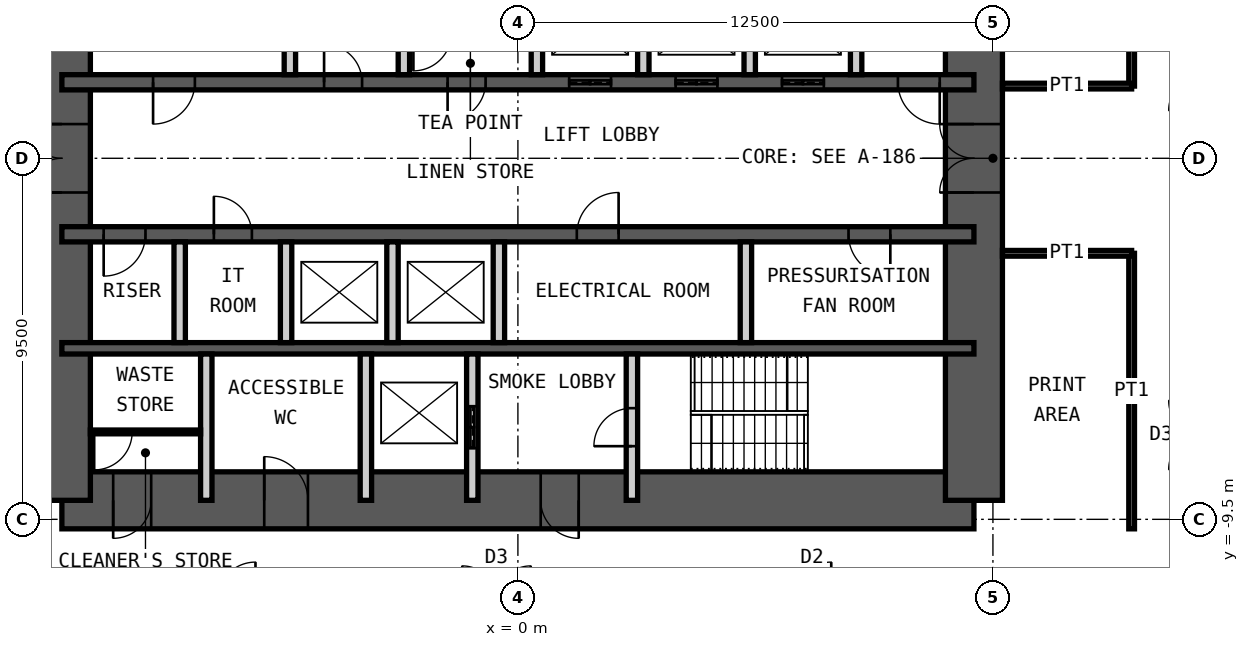
"""IFC4 building model, lengths in metres.
Left out: names, types, materials, properties, quantities, classifications, styles, units other than length and angle.
Written with IfcOpenShell. Run it as: python <this file> out.ifc"""

import sys

from ifc_helpers import new_model, si_unit, direction, frame, frame_2d, origin, place, context, subcontext, project, spatial, rectangle, extrude, element, fill, save


model = new_model("IFC4")
c1 = context("Model", 3, precision=1e-05, world=origin(), true_north=direction((0.0, 1.0)))
c2 = subcontext(c1, "Body", "Model", "MODEL_VIEW")
j1 = project(units=[si_unit("LENGTHUNIT", "METRE"), si_unit("PLANEANGLEUNIT", "RADIAN")], contexts=[c1])
p1 = place(None, origin())
s1 = spatial("IfcSite", under=j1, at=p1, CompositionType="ELEMENT")
p2 = place(p1, origin())
s2 = spatial("IfcBuilding", under=s1, at=p2, CompositionType="ELEMENT")
p3 = place(p2, frame((0.0, 0.0, 149.2)))
s3 = spatial("IfcBuildingStorey", under=s2, at=p3, CompositionType="ELEMENT", Elevation=149.2)
p4 = place(p3, frame((-12.0, -9.0, 0.0), z_axis=(0.0, 0.0, 1.0), x_axis=(1.0, 0.0, 0.0)))
e1 = element("IfcWall", 1, at=p4, inside=s3, PredefinedType="SHEAR", context=c2, shape_type="SweptSolid", body=[
    extrude(rectangle(XDim=24.0, YDim=1.5, at=frame_2d((12.0, 0.0))), origin(), (0.0, 0.0, 1.0), 4.2),
])
p5 = place(p4, frame((1.35, 0.0, 0.0)))
e2 = element("IfcOpeningElement", 2, at=p5, cuts=e1, PredefinedType="OPENING", context=c2, shape_type="SweptSolid", body=[
    extrude(rectangle(XDim=1.0, YDim=2.1, at=frame_2d((0.5, 1.05))), frame((0.0, 0.76, 0.0), z_axis=(0.0, -1.0, 0.0), x_axis=(1.0, 0.0, 0.0)), (0.0, 0.0, 1.0), 1.52),
])
p6 = place(p4, frame((5.325, 0.0, 0.0)))
e3 = element("IfcOpeningElement", 3, at=p6, cuts=e1, PredefinedType="OPENING", context=c2, shape_type="SweptSolid", body=[
    extrude(rectangle(XDim=1.15, YDim=2.1, at=frame_2d((0.575, 1.05))), frame((0.0, 0.76, 0.0), z_axis=(0.0, -1.0, 0.0), x_axis=(1.0, 0.0, 0.0)), (0.0, 0.0, 1.0), 1.52),
])
p7 = place(p4, frame((12.6, 0.0, 0.0)))
e4 = element("IfcOpeningElement", 4, at=p7, cuts=e1, PredefinedType="OPENING", context=c2, shape_type="SweptSolid", body=[
    extrude(rectangle(XDim=1.0, YDim=2.1, at=frame_2d((0.5, 1.05))), frame((0.0, 0.76, 0.0), z_axis=(0.0, -1.0, 0.0), x_axis=(1.0, 0.0, 0.0)), (0.0, 0.0, 1.0), 1.52),
])
p8 = place(p3, frame((12.0, -9.0, 0.0), z_axis=(0.0, 0.0, 1.0), x_axis=(0.0, 1.0, 0.0)))
e5 = element("IfcWall", 5, at=p8, inside=s3, PredefinedType="SHEAR", context=c2, shape_type="SweptSolid", body=[
    extrude(rectangle(XDim=18.0, YDim=1.5, at=frame_2d((9.0, 0.0))), origin(), (0.0, 0.0, 1.0), 4.2),
])
p9 = place(p8, frame((8.1, 0.0, 0.0)))
e6 = element("IfcOpeningElement", 6, at=p9, cuts=e5, PredefinedType="OPENING", context=c2, shape_type="SweptSolid", body=[
    extrude(rectangle(XDim=1.8, YDim=2.1, at=frame_2d((0.9, 1.05))), frame((0.0, 0.76, 0.0), z_axis=(0.0, -1.0, 0.0), x_axis=(1.0, 0.0, 0.0)), (0.0, 0.0, 1.0), 1.52),
])
p10 = place(p3, frame((-12.0, -9.0, 0.0), z_axis=(0.0, 0.0, 1.0), x_axis=(0.0, 1.0, 0.0)))
e7 = element("IfcWall", 7, at=p10, inside=s3, PredefinedType="SHEAR", context=c2, shape_type="SweptSolid", body=[
    extrude(rectangle(XDim=18.0, YDim=1.5, at=frame_2d((9.0, 0.0))), origin(), (0.0, 0.0, 1.0), 4.2),
])
p11 = place(p10, frame((8.1, 0.0, 0.0)))
e8 = element("IfcOpeningElement", 8, at=p11, cuts=e7, PredefinedType="OPENING", context=c2, shape_type="SweptSolid", body=[
    extrude(rectangle(XDim=1.8, YDim=2.1, at=frame_2d((0.9, 1.05))), frame((0.0, 0.76, 0.0), z_axis=(0.0, -1.0, 0.0), x_axis=(1.0, 0.0, 0.0)), (0.0, 0.0, 1.0), 1.52),
])
p12 = place(p3, frame((-12.0, 2.0, 0.0), z_axis=(0.0, 0.0, 1.0), x_axis=(1.0, 0.0, 0.0)))
e9 = element("IfcWall", 9, at=p12, inside=s3, PredefinedType="SHEAR", context=c2, shape_type="SweptSolid", body=[
    extrude(rectangle(XDim=24.0, YDim=0.4, at=frame_2d((12.0, 0.0))), origin(), (0.0, 0.0, 1.0), 4.2),
])
p13 = place(p12, frame((2.4, 0.0, 0.0)))
e10 = element("IfcOpeningElement", 10, at=p13, cuts=e9, PredefinedType="OPENING", context=c2, shape_type="SweptSolid", body=[
    extrude(rectangle(XDim=1.1, YDim=2.1, at=frame_2d((0.55, 1.05))), frame((0.0, 0.21, 0.0), z_axis=(0.0, -1.0, 0.0), x_axis=(1.0, 0.0, 0.0)), (0.0, 0.0, 1.0), 0.42),
])
p14 = place(p12, frame((22.0, 0.0, 0.0)))
e11 = element("IfcOpeningElement", 11, at=p14, cuts=e9, PredefinedType="OPENING", context=c2, shape_type="SweptSolid", body=[
    extrude(rectangle(XDim=1.1, YDim=2.1, at=frame_2d((0.55, 1.05))), frame((0.0, 0.21, 0.0), z_axis=(0.0, -1.0, 0.0), x_axis=(1.0, 0.0, 0.0)), (0.0, 0.0, 1.0), 0.42),
])
p15 = place(p12, frame((10.15, 0.0, 0.0)))
e12 = element("IfcOpeningElement", 12, at=p15, cuts=e9, PredefinedType="OPENING", context=c2, shape_type="SweptSolid", body=[
    extrude(rectangle(XDim=1.0, YDim=2.1, at=frame_2d((0.5, 1.05))), frame((0.0, 0.21, 0.0), z_axis=(0.0, -1.0, 0.0), x_axis=(1.0, 0.0, 0.0)), (0.0, 0.0, 1.0), 0.42),
])
p16 = place(p12, frame((6.9, 0.0, 0.0)))
e13 = element("IfcOpeningElement", 13, at=p16, cuts=e9, PredefinedType="OPENING", context=c2, shape_type="SweptSolid", body=[
    extrude(rectangle(XDim=1.0, YDim=2.1, at=frame_2d((0.5, 1.05))), frame((0.0, 0.21, 0.0), z_axis=(0.0, -1.0, 0.0), x_axis=(1.0, 0.0, 0.0)), (0.0, 0.0, 1.0), 0.42),
])
p17 = place(p12, frame((13.35, 0.0, 0.0)))
e14 = element("IfcOpeningElement", 14, at=p17, cuts=e9, PredefinedType="OPENING", context=c2, shape_type="SweptSolid", body=[
    extrude(rectangle(XDim=1.1, YDim=2.4, at=frame_2d((0.55, 1.2))), frame((0.0, 0.21, 0.0), z_axis=(0.0, -1.0, 0.0), x_axis=(1.0, 0.0, 0.0)), (0.0, 0.0, 1.0), 0.42),
])
p18 = place(p12, frame((16.15, 0.0, 0.0)))
e15 = element("IfcOpeningElement", 15, at=p18, cuts=e9, PredefinedType="OPENING", context=c2, shape_type="SweptSolid", body=[
    extrude(rectangle(XDim=1.1, YDim=2.4, at=frame_2d((0.55, 1.2))), frame((0.0, 0.21, 0.0), z_axis=(0.0, -1.0, 0.0), x_axis=(1.0, 0.0, 0.0)), (0.0, 0.0, 1.0), 0.42),
])
p19 = place(p12, frame((18.95, 0.0, 0.0)))
e16 = element("IfcOpeningElement", 16, at=p19, cuts=e9, PredefinedType="OPENING", context=c2, shape_type="SweptSolid", body=[
    extrude(rectangle(XDim=1.1, YDim=2.4, at=frame_2d((0.55, 1.2))), frame((0.0, 0.21, 0.0), z_axis=(0.0, -1.0, 0.0), x_axis=(1.0, 0.0, 0.0)), (0.0, 0.0, 1.0), 0.42),
])
p20 = place(p3, frame((-12.0, -2.0, 0.0), z_axis=(0.0, 0.0, 1.0), x_axis=(1.0, 0.0, 0.0)))
e17 = element("IfcWall", 17, at=p20, inside=s3, PredefinedType="SHEAR", context=c2, shape_type="SweptSolid", body=[
    extrude(rectangle(XDim=24.0, YDim=0.4, at=frame_2d((12.0, 0.0))), origin(), (0.0, 0.0, 1.0), 4.2),
])
p21 = place(p20, frame((1.1, 0.0, 0.0)))
e18 = element("IfcOpeningElement", 18, at=p21, cuts=e17, PredefinedType="OPENING", context=c2, shape_type="SweptSolid", body=[
    extrude(rectangle(XDim=1.1, YDim=2.1, at=frame_2d((0.55, 1.05))), frame((0.0, 0.21, 0.0), z_axis=(0.0, -1.0, 0.0), x_axis=(1.0, 0.0, 0.0)), (0.0, 0.0, 1.0), 0.42),
])
p22 = place(p20, frame((13.55, 0.0, 0.0)))
e19 = element("IfcOpeningElement", 19, at=p22, cuts=e17, PredefinedType="OPENING", context=c2, shape_type="SweptSolid", body=[
    extrude(rectangle(XDim=1.1, YDim=2.1, at=frame_2d((0.55, 1.05))), frame((0.0, 0.21, 0.0), z_axis=(0.0, -1.0, 0.0), x_axis=(1.0, 0.0, 0.0)), (0.0, 0.0, 1.0), 0.42),
])
p23 = place(p20, frame((20.7, 0.0, 0.0)))
e20 = element("IfcOpeningElement", 20, at=p23, cuts=e17, PredefinedType="OPENING", context=c2, shape_type="SweptSolid", body=[
    extrude(rectangle(XDim=1.1, YDim=2.1, at=frame_2d((0.55, 1.05))), frame((0.0, 0.21, 0.0), z_axis=(0.0, -1.0, 0.0), x_axis=(1.0, 0.0, 0.0)), (0.0, 0.0, 1.0), 0.42),
])
p24 = place(p20, frame((4.0, 0.0, 0.0)))
e21 = element("IfcOpeningElement", 21, at=p24, cuts=e17, PredefinedType="OPENING", context=c2, shape_type="SweptSolid", body=[
    extrude(rectangle(XDim=1.0, YDim=2.1, at=frame_2d((0.5, 1.05))), frame((0.0, 0.21, 0.0), z_axis=(0.0, -1.0, 0.0), x_axis=(1.0, 0.0, 0.0)), (0.0, 0.0, 1.0), 0.42),
])
p25 = place(p3, frame((-12.0, -5.0, 0.0), z_axis=(0.0, 0.0, 1.0), x_axis=(1.0, 0.0, 0.0)))
e22 = element("IfcWall", 22, at=p25, inside=s3, PredefinedType="SHEAR", context=c2, shape_type="SweptSolid", body=[
    extrude(rectangle(XDim=24.0, YDim=0.3, at=frame_2d((12.0, 0.0))), origin(), (0.0, 0.0, 1.0), 4.2),
])
for number, where, z_axis, x_axis in (
    (23, (-6.0, 2.2, 0.0), (0.0, 0.0, 1.0), (0.0, 1.0, 0.0)),
    (24, (-3.0, 2.2, 0.0), (0.0, 0.0, 1.0), (0.0, 1.0, 0.0)),
    (25, (0.5, 2.2, 0.0), (0.0, 0.0, 1.0), (0.0, 1.0, 0.0)),
    (26, (3.3, 2.2, 0.0), (0.0, 0.0, 1.0), (0.0, 1.0, 0.0)),
    (27, (6.1, 2.2, 0.0), (0.0, 0.0, 1.0), (0.0, 1.0, 0.0)),
    (28, (8.9, 2.2, 0.0), (0.0, 0.0, 1.0), (0.0, 1.0, 0.0)),
    (29, (-8.9, -4.85, 0.0), (0.0, 0.0, 1.0), (0.0, 1.0, 0.0)),
    (30, (-6.1, -4.85, 0.0), (0.0, 0.0, 1.0), (0.0, 1.0, 0.0)),
    (31, (-3.3, -4.85, 0.0), (0.0, 0.0, 1.0), (0.0, 1.0, 0.0)),
    (32, (-0.5, -4.85, 0.0), (0.0, 0.0, 1.0), (0.0, 1.0, 0.0)),
    (33, (6.0, -4.85, 0.0), (0.0, 0.0, 1.0), (0.0, 1.0, 0.0)),
):
    element("IfcWall", number, at=place(p3, frame(where, z_axis=z_axis, x_axis=x_axis)), inside=s3, PredefinedType="PARTITIONING", context=c2, shape_type="SweptSolid", body=[
        extrude(rectangle(XDim=2.65, YDim=0.3, at=frame_2d((1.325, 0.0))), origin(), (0.0, 0.0, 1.0), 3.98),
    ])
for number, where, z_axis, x_axis in (
    (34, (-8.2, -9.0, 0.0), (0.0, 0.0, 1.0), (0.0, 1.0, 0.0)),
    (35, (-4.0, -9.0, 0.0), (0.0, 0.0, 1.0), (0.0, 1.0, 0.0)),
):
    element("IfcWall", number, at=place(p3, frame(where, z_axis=z_axis, x_axis=x_axis)), inside=s3, PredefinedType="PARTITIONING", context=c2, shape_type="SweptSolid", body=[
        extrude(rectangle(XDim=3.85, YDim=0.3, at=frame_2d((1.925, 0.0))), origin(), (0.0, 0.0, 1.0), 3.98),
    ])
p26 = place(p3, frame((-1.2, -9.0, 0.0), z_axis=(0.0, 0.0, 1.0), x_axis=(0.0, 1.0, 0.0)))
e36 = element("IfcWall", 36, at=p26, inside=s3, PredefinedType="PARTITIONING", context=c2, shape_type="SweptSolid", body=[
    extrude(rectangle(XDim=3.85, YDim=0.3, at=frame_2d((1.925, 0.0))), origin(), (0.0, 0.0, 1.0), 3.98),
])
p27 = place(p26, frame((1.375, 0.0, 0.0)))
e37 = element("IfcOpeningElement", 37, at=p27, cuts=e36, PredefinedType="OPENING", context=c2, shape_type="SweptSolid", body=[
    extrude(rectangle(XDim=1.1, YDim=2.4, at=frame_2d((0.55, 1.2))), frame((0.0, 0.16, 0.0), z_axis=(0.0, -1.0, 0.0), x_axis=(1.0, 0.0, 0.0)), (0.0, 0.0, 1.0), 0.32),
])
p28 = place(p3, frame((3.0, -9.0, 0.0), z_axis=(0.0, 0.0, 1.0), x_axis=(0.0, 1.0, 0.0)))
e38 = element("IfcWall", 38, at=p28, inside=s3, PredefinedType="PARTITIONING", context=c2, shape_type="SweptSolid", body=[
    extrude(rectangle(XDim=3.85, YDim=0.3, at=frame_2d((1.925, 0.0))), origin(), (0.0, 0.0, 1.0), 3.98),
])
p29 = place(p28, frame((1.425, 0.0, 0.0)))
e39 = element("IfcOpeningElement", 39, at=p29, cuts=e38, PredefinedType="OPENING", context=c2, shape_type="SweptSolid", body=[
    extrude(rectangle(XDim=1.0, YDim=2.1, at=frame_2d((0.5, 1.05))), frame((0.0, 0.16, 0.0), z_axis=(0.0, -1.0, 0.0), x_axis=(1.0, 0.0, 0.0)), (0.0, 0.0, 1.0), 0.32),
])
p30 = place(p3, frame((-11.25, -7.2, 0.0), z_axis=(0.0, 0.0, 1.0), x_axis=(1.0, 0.0, 0.0)))
e40 = element("IfcWall", 40, at=p30, inside=s3, PredefinedType="PARTITIONING", context=c2, shape_type="SweptSolid", body=[
    extrude(rectangle(XDim=2.9, YDim=0.1, at=frame_2d((1.45, 0.0))), origin(), (0.0, 0.0, 1.0), 3.98),
])
p31 = place(p30, frame((0.1, 0.0, 0.0)))
e41 = element("IfcOpeningElement", 41, at=p31, cuts=e40, PredefinedType="OPENING", context=c2, shape_type="SweptSolid", body=[
    extrude(rectangle(XDim=1.0, YDim=2.4, at=frame_2d((0.5, 1.2))), frame((0.0, 0.06, 0.0), z_axis=(0.0, -1.0, 0.0), x_axis=(1.0, 0.0, 0.0)), (0.0, 0.0, 1.0), 0.12),
])
p32 = place(p3, frame((16.15, 1.9, 0.0), z_axis=(0.0, 0.0, 1.0), x_axis=(0.0, 1.0, 0.0)))
e42 = element("IfcWall", 42, at=p32, inside=s3, PredefinedType="PARTITIONING", context=c2, shape_type="SweptSolid", body=[
    extrude(rectangle(XDim=7.85, YDim=0.15, at=frame_2d((3.925, 0.0))), origin(), (0.0, 0.0, 1.0), 4.03),
])
p33 = place(p3, frame((12.75, 1.9, 0.0), z_axis=(0.0, 0.0, 1.0), x_axis=(1.0, 0.0, 0.0)))
e43 = element("IfcWall", 43, at=p33, inside=s3, PredefinedType="PARTITIONING", context=c2, shape_type="SweptSolid", body=[
    extrude(rectangle(XDim=3.4, YDim=0.15, at=frame_2d((1.7, 0.0))), origin(), (0.0, 0.0, 1.0), 2.93),
])
p34 = place(p3, frame((16.15, -9.75, 0.0), z_axis=(0.0, 0.0, 1.0), x_axis=(0.0, 1.0, 0.0)))
e44 = element("IfcWall", 44, at=p34, inside=s3, PredefinedType="PARTITIONING", context=c2, shape_type="SweptSolid", body=[
    extrude(rectangle(XDim=7.25, YDim=0.15, at=frame_2d((3.625, 0.0))), origin(), (0.0, 0.0, 1.0), 4.03),
])
p35 = place(p3, frame((12.75, -2.5, 0.0), z_axis=(0.0, 0.0, 1.0), x_axis=(1.0, 0.0, 0.0)))
e45 = element("IfcWall", 45, at=p35, inside=s3, PredefinedType="PARTITIONING", context=c2, shape_type="SweptSolid", body=[
    extrude(rectangle(XDim=3.4, YDim=0.15, at=frame_2d((1.7, 0.0))), origin(), (0.0, 0.0, 1.0), 3.33),
])
p36 = place(p5, origin())
e46 = element("IfcDoor", 46, at=p36, inside=s3, OperationType="SINGLE_SWING_LEFT", PredefinedType="DOOR", context=c2, shape_type="SweptSolid", body=[
    extrude(rectangle(XDim=1.0, YDim=2.1, at=frame_2d((0.5, 1.05))), frame((0.0, 0.025, 0.0), z_axis=(0.0, -1.0, 0.0), x_axis=(1.0, 0.0, 0.0)), (0.0, 0.0, 1.0), 0.05),
])
fill(e2, e46)
p37 = place(p6, origin())
e47 = element("IfcDoor", 47, at=p37, inside=s3, OperationType="SINGLE_SWING_RIGHT", PredefinedType="DOOR", context=c2, shape_type="SweptSolid", body=[
    extrude(rectangle(XDim=1.15, YDim=2.1, at=frame_2d((0.575, 1.05))), frame((0.0, 0.025, 0.0), z_axis=(0.0, -1.0, 0.0), x_axis=(1.0, 0.0, 0.0)), (0.0, 0.0, 1.0), 0.05),
])
fill(e3, e47)
p38 = place(p7, origin())
e48 = element("IfcDoor", 48, at=p38, inside=s3, OperationType="SINGLE_SWING_RIGHT", PredefinedType="DOOR", context=c2, shape_type="SweptSolid", body=[
    extrude(rectangle(XDim=1.0, YDim=2.1, at=frame_2d((0.5, 1.05))), frame((0.0, 0.025, 0.0), z_axis=(0.0, -1.0, 0.0), x_axis=(1.0, 0.0, 0.0)), (0.0, 0.0, 1.0), 0.05),
])
fill(e4, e48)
p39 = place(p29, origin())
e49 = element("IfcDoor", 49, at=p39, inside=s3, OperationType="SINGLE_SWING_RIGHT", PredefinedType="DOOR", context=c2, shape_type="SweptSolid", body=[
    extrude(rectangle(XDim=1.0, YDim=2.1, at=frame_2d((0.5, 1.05))), frame((0.0, 0.025, 0.0), z_axis=(0.0, -1.0, 0.0), x_axis=(1.0, 0.0, 0.0)), (0.0, 0.0, 1.0), 0.05),
])
fill(e39, e49)
p40 = place(p13, origin())
e50 = element("IfcDoor", 50, at=p40, inside=s3, OperationType="SINGLE_SWING_LEFT", PredefinedType="DOOR", context=c2, shape_type="SweptSolid", body=[
    extrude(rectangle(XDim=1.1, YDim=2.1, at=frame_2d((0.55, 1.05))), frame((0.0, 0.025, 0.0), z_axis=(0.0, -1.0, 0.0), x_axis=(1.0, 0.0, 0.0)), (0.0, 0.0, 1.0), 0.05),
])
fill(e10, e50)
p41 = place(p21, origin())
e51 = element("IfcDoor", 51, at=p41, inside=s3, OperationType="SINGLE_SWING_LEFT", PredefinedType="DOOR", context=c2, shape_type="SweptSolid", body=[
    extrude(rectangle(XDim=1.1, YDim=2.1, at=frame_2d((0.55, 1.05))), frame((0.0, 0.025, 0.0), z_axis=(0.0, -1.0, 0.0), x_axis=(1.0, 0.0, 0.0)), (0.0, 0.0, 1.0), 0.05),
])
fill(e18, e51)
p42 = place(p14, origin())
e52 = element("IfcDoor", 52, at=p42, inside=s3, OperationType="SINGLE_SWING_RIGHT", PredefinedType="DOOR", context=c2, shape_type="SweptSolid", body=[
    extrude(rectangle(XDim=1.1, YDim=2.1, at=frame_2d((0.55, 1.05))), frame((0.0, 0.025, 0.0), z_axis=(0.0, -1.0, 0.0), x_axis=(1.0, 0.0, 0.0)), (0.0, 0.0, 1.0), 0.05),
])
fill(e11, e52)
p43 = place(p15, origin())
e53 = element("IfcDoor", 53, at=p43, inside=s3, OperationType="SINGLE_SWING_LEFT", PredefinedType="DOOR", context=c2, shape_type="SweptSolid", body=[
    extrude(rectangle(XDim=1.0, YDim=2.1, at=frame_2d((0.5, 1.05))), frame((0.0, 0.025, 0.0), z_axis=(0.0, -1.0, 0.0), x_axis=(1.0, 0.0, 0.0)), (0.0, 0.0, 1.0), 0.05),
])
fill(e12, e53)
p44 = place(p22, origin())
e54 = element("IfcDoor", 54, at=p44, inside=s3, OperationType="SINGLE_SWING_LEFT", PredefinedType="DOOR", context=c2, shape_type="SweptSolid", body=[
    extrude(rectangle(XDim=1.1, YDim=2.1, at=frame_2d((0.55, 1.05))), frame((0.0, 0.025, 0.0), z_axis=(0.0, -1.0, 0.0), x_axis=(1.0, 0.0, 0.0)), (0.0, 0.0, 1.0), 0.05),
])
fill(e19, e54)
p45 = place(p23, origin())
e55 = element("IfcDoor", 55, at=p45, inside=s3, OperationType="SINGLE_SWING_RIGHT", PredefinedType="DOOR", context=c2, shape_type="SweptSolid", body=[
    extrude(rectangle(XDim=1.1, YDim=2.1, at=frame_2d((0.55, 1.05))), frame((0.0, 0.025, 0.0), z_axis=(0.0, -1.0, 0.0), x_axis=(1.0, 0.0, 0.0)), (0.0, 0.0, 1.0), 0.05),
])
fill(e20, e55)
p46 = place(p9, origin())
e56 = element("IfcDoor", 56, at=p46, inside=s3, OperationType="DOUBLE_DOOR_DOUBLE_SWING", PredefinedType="DOOR", context=c2, shape_type="SweptSolid", body=[
    extrude(rectangle(XDim=1.8, YDim=2.1, at=frame_2d((0.9, 1.05))), frame((0.0, 0.025, 0.0), z_axis=(0.0, -1.0, 0.0), x_axis=(1.0, 0.0, 0.0)), (0.0, 0.0, 1.0), 0.05),
])
fill(e6, e56)
p47 = place(p11, origin())
e57 = element("IfcDoor", 57, at=p47, inside=s3, OperationType="DOUBLE_DOOR_DOUBLE_SWING", PredefinedType="DOOR", context=c2, shape_type="SweptSolid", body=[
    extrude(rectangle(XDim=1.8, YDim=2.1, at=frame_2d((0.9, 1.05))), frame((0.0, 0.025, 0.0), z_axis=(0.0, -1.0, 0.0), x_axis=(1.0, 0.0, 0.0)), (0.0, 0.0, 1.0), 0.05),
])
fill(e8, e57)
p48 = place(p27, origin())
e58 = element("IfcDoor", 58, at=p48, inside=s3, OperationType="DOUBLE_DOOR_SLIDING", PredefinedType="DOOR", context=c2, shape_type="SweptSolid", body=[
    extrude(rectangle(XDim=1.1, YDim=2.4, at=frame_2d((0.55, 1.2))), frame((0.0, 0.025, 0.0), z_axis=(0.0, -1.0, 0.0), x_axis=(1.0, 0.0, 0.0)), (0.0, 0.0, 1.0), 0.05),
])
fill(e37, e58)
p49 = place(p16, origin())
e59 = element("IfcDoor", 59, at=p49, inside=s3, OperationType="SINGLE_SWING_RIGHT", PredefinedType="DOOR", context=c2, shape_type="SweptSolid", body=[
    extrude(rectangle(XDim=1.0, YDim=2.1, at=frame_2d((0.5, 1.05))), frame((0.0, 0.025, 0.0), z_axis=(0.0, -1.0, 0.0), x_axis=(1.0, 0.0, 0.0)), (0.0, 0.0, 1.0), 0.05),
])
fill(e13, e59)
p50 = place(p17, origin())
e60 = element("IfcDoor", 60, at=p50, inside=s3, OperationType="DOUBLE_DOOR_SLIDING", PredefinedType="DOOR", context=c2, shape_type="SweptSolid", body=[
    extrude(rectangle(XDim=1.1, YDim=2.4, at=frame_2d((0.55, 1.2))), frame((0.0, 0.025, 0.0), z_axis=(0.0, -1.0, 0.0), x_axis=(1.0, 0.0, 0.0)), (0.0, 0.0, 1.0), 0.05),
])
fill(e14, e60)
p51 = place(p18, origin())
e61 = element("IfcDoor", 61, at=p51, inside=s3, OperationType="DOUBLE_DOOR_SLIDING", PredefinedType="DOOR", context=c2, shape_type="SweptSolid", body=[
    extrude(rectangle(XDim=1.1, YDim=2.4, at=frame_2d((0.55, 1.2))), frame((0.0, 0.025, 0.0), z_axis=(0.0, -1.0, 0.0), x_axis=(1.0, 0.0, 0.0)), (0.0, 0.0, 1.0), 0.05),
])
fill(e15, e61)
p52 = place(p19, origin())
e62 = element("IfcDoor", 62, at=p52, inside=s3, OperationType="DOUBLE_DOOR_SLIDING", PredefinedType="DOOR", context=c2, shape_type="SweptSolid", body=[
    extrude(rectangle(XDim=1.1, YDim=2.4, at=frame_2d((0.55, 1.2))), frame((0.0, 0.025, 0.0), z_axis=(0.0, -1.0, 0.0), x_axis=(1.0, 0.0, 0.0)), (0.0, 0.0, 1.0), 0.05),
])
fill(e16, e62)
p53 = place(p24, origin())
e63 = element("IfcDoor", 63, at=p53, inside=s3, OperationType="SINGLE_SWING_RIGHT", PredefinedType="DOOR", context=c2, shape_type="SweptSolid", body=[
    extrude(rectangle(XDim=1.0, YDim=2.1, at=frame_2d((0.5, 1.05))), frame((0.0, 0.025, 0.0), z_axis=(0.0, -1.0, 0.0), x_axis=(1.0, 0.0, 0.0)), (0.0, 0.0, 1.0), 0.05),
])
fill(e21, e63)
p54 = place(p31, origin())
e64 = element("IfcDoor", 64, at=p54, inside=s3, OperationType="SINGLE_SWING_LEFT", PredefinedType="DOOR", context=c2, shape_type="SweptSolid", body=[
    extrude(rectangle(XDim=1.0, YDim=2.4, at=frame_2d((0.5, 1.2))), frame((0.0, 0.025, 0.0), z_axis=(0.0, -1.0, 0.0), x_axis=(1.0, 0.0, 0.0)), (0.0, 0.0, 1.0), 0.05),
])
fill(e41, e64)
save(model, sys.argv[1])
